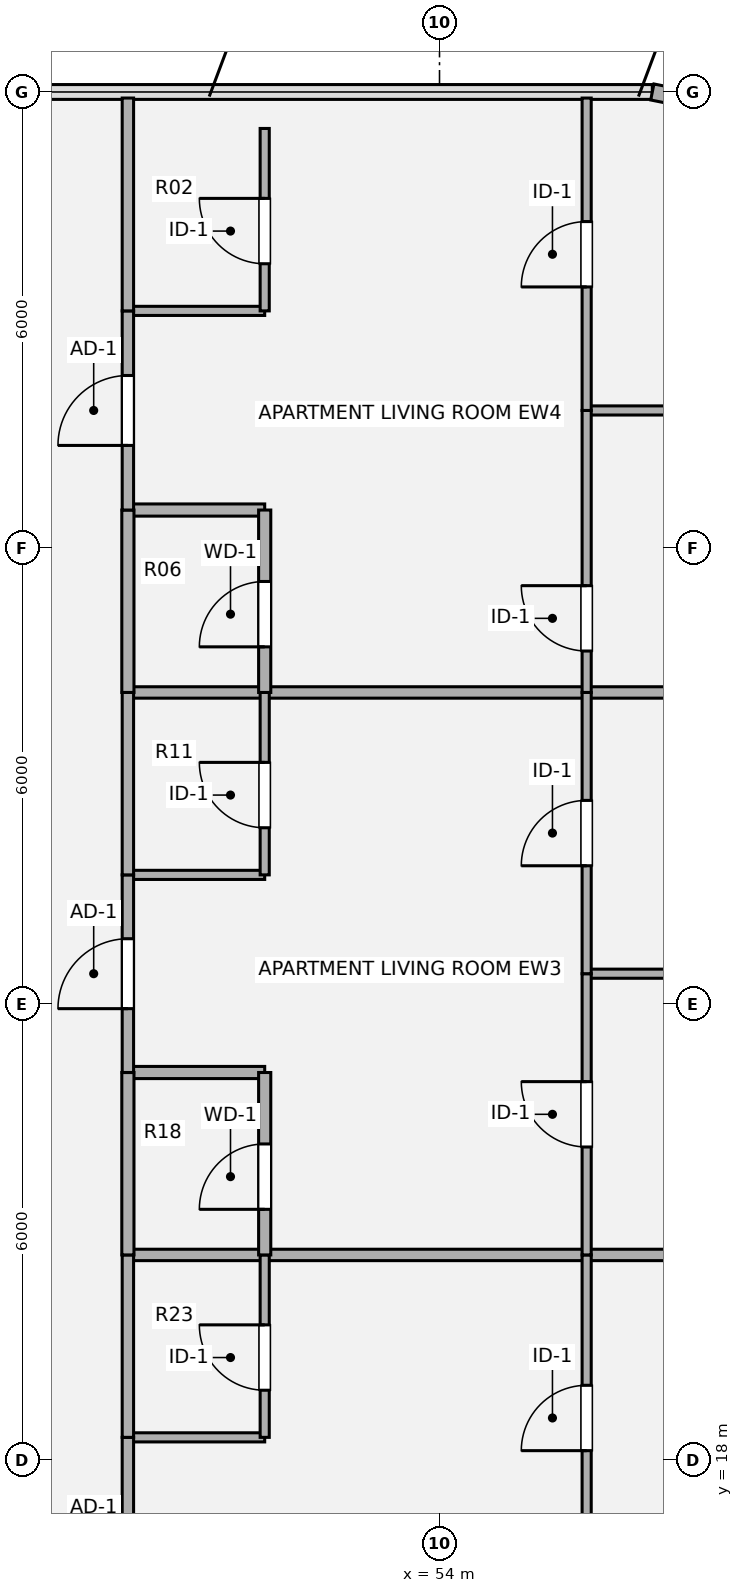
"""IFC4 building model, lengths in metres.
Left out: names, types, materials, properties, quantities, classifications, styles, units other than length and angle.
Written with IfcOpenShell. Run it as: python <this file> out.ifc"""

import sys

from ifc_helpers import new_model, si_unit, direction, frame, frame_2d, origin, origin_2d, place, context, subcontext, project, spatial, rectangle, extrude, source, transform, mapped, element, fill, save


model = new_model("IFC4")
c1 = context("Model", 3, precision=1e-05, world=origin(), true_north=direction((0.0, 1.0)))
c2 = subcontext(c1, "Body", "Model", "MODEL_VIEW")
j1 = project(units=[si_unit("LENGTHUNIT", "METRE"), si_unit("PLANEANGLEUNIT", "RADIAN")], contexts=[c1])
p1 = place(None, origin())
s1 = spatial("IfcSite", under=j1, at=p1, CompositionType="ELEMENT")
p2 = place(p1, origin())
s2 = spatial("IfcBuilding", under=s1, at=p2, CompositionType="ELEMENT")
p3 = place(p2, frame((0.0, 0.0, 30.78)))
s3 = spatial("IfcBuildingStorey", under=s2, at=p3, CompositionType="ELEMENT", Elevation=30.78)
p4 = place(p3, frame((56.8, 36.0, 0.0), z_axis=(0.0, 0.0, 1.0), x_axis=(0.980775717779, -0.195138390419, 0.0)))
e1 = element("IfcWall", 1, at=p4, inside=s3, PredefinedType="SOLIDWALL", context=c2, shape_type="SweptSolid", body=[
    extrude(rectangle(XDim=1.249, YDim=0.215, at=frame_2d((0.624, 0.0))), origin(), (0.0, 0.0, 1.0), 3.53),
])
p5 = place(p3, frame((49.9, 18.3, 0.0), z_axis=(0.0, 0.0, 1.0), x_axis=(1.0, 0.0, 0.0)))
e2 = element("IfcWall", 2, at=p5, inside=s3, PredefinedType="PARTITIONING", context=c2, shape_type="SweptSolid", body=[
    extrude(rectangle(XDim=1.8, YDim=0.12, at=frame_2d((0.9, 0.0))), origin(), (0.0, 0.0, 1.0), 2.715),
])
p6 = place(p3, frame((49.9, 20.7, 0.0), z_axis=(0.0, 0.0, 1.0), x_axis=(1.0, 0.0, 0.0)))
e3 = element("IfcWall", 3, at=p6, inside=s3, PredefinedType="PARTITIONING", context=c2, shape_type="SweptSolid", body=[
    extrude(rectangle(XDim=10.02, YDim=0.15, at=frame_2d((5.01, 0.0))), origin(), (0.0, 0.0, 1.0), 2.982),
])
p7 = place(p3, frame((49.9, 23.1, 0.0), z_axis=(0.0, 0.0, 1.0), x_axis=(1.0, 0.0, 0.0)))
e4 = element("IfcWall", 4, at=p7, inside=s3, PredefinedType="PLUMBINGWALL", context=c2, shape_type="SweptSolid", body=[
    extrude(rectangle(XDim=1.8, YDim=0.16, at=frame_2d((0.9, 0.0))), origin(), (0.0, 0.0, 1.0), 3.055),
])
p8 = place(p3, frame((55.936, 24.4, 0.0), z_axis=(0.0, 0.0, 1.0), x_axis=(1.0, 0.0, 0.0)))
e5 = element("IfcWall", 5, at=p8, inside=s3, PredefinedType="PARTITIONING", context=c2, shape_type="SweptSolid", body=[
    extrude(rectangle(XDim=3.984, YDim=0.12, at=frame_2d((1.992, 0.0))), origin(), (0.0, 0.0, 1.0), 2.982),
])
p9 = place(p3, frame((49.9, 25.7, 0.0), z_axis=(0.0, 0.0, 1.0), x_axis=(1.0, 0.0, 0.0)))
e6 = element("IfcWall", 6, at=p9, inside=s3, PredefinedType="PARTITIONING", context=c2, shape_type="SweptSolid", body=[
    extrude(rectangle(XDim=1.8, YDim=0.12, at=frame_2d((0.9, 0.0))), origin(), (0.0, 0.0, 1.0), 2.982),
])
p10 = place(p3, frame((49.9, 28.1, 0.0), z_axis=(0.0, 0.0, 1.0), x_axis=(1.0, 0.0, 0.0)))
e7 = element("IfcWall", 7, at=p10, inside=s3, PredefinedType="PARTITIONING", context=c2, shape_type="SweptSolid", body=[
    extrude(rectangle(XDim=10.02, YDim=0.15, at=frame_2d((5.01, 0.0))), origin(), (0.0, 0.0, 1.0), 2.982),
])
p11 = place(p3, frame((49.9, 30.5, 0.0), z_axis=(0.0, 0.0, 1.0), x_axis=(1.0, 0.0, 0.0)))
e8 = element("IfcWall", 8, at=p11, inside=s3, PredefinedType="PLUMBINGWALL", context=c2, shape_type="SweptSolid", body=[
    extrude(rectangle(XDim=1.8, YDim=0.16, at=frame_2d((0.9, 0.0))), origin(), (0.0, 0.0, 1.0), 2.903),
])
p12 = place(p3, frame((55.936, 31.81, 0.0), z_axis=(0.0, 0.0, 1.0), x_axis=(1.0, 0.0, 0.0)))
e9 = element("IfcWall", 9, at=p12, inside=s3, PredefinedType="PARTITIONING", context=c2, shape_type="SweptSolid", body=[
    extrude(rectangle(XDim=3.984, YDim=0.12, at=frame_2d((1.992, 0.0))), origin(), (0.0, 0.0, 1.0), 3.5),
])
p13 = place(p3, frame((49.9, 33.12, 0.0), z_axis=(0.0, 0.0, 1.0), x_axis=(1.0, 0.0, 0.0)))
e10 = element("IfcWall", 10, at=p13, inside=s3, PredefinedType="PARTITIONING", context=c2, shape_type="SweptSolid", body=[
    extrude(rectangle(XDim=1.8, YDim=0.12, at=frame_2d((0.9, 0.0))), origin(), (0.0, 0.0, 1.0), 3.055),
])
p14 = place(p3, frame((49.9, 15.8, 0.0), z_axis=(0.0, 0.0, 1.0), x_axis=(0.0, 1.0, 0.0)))
e11 = element("IfcWall", 11, at=p14, inside=s3, PredefinedType="PARTITIONING", context=c2, shape_type="SweptSolid", body=[
    extrude(rectangle(XDim=2.5, YDim=0.15, at=frame_2d((1.25, 0.0))), origin(), (0.0, 0.0, 1.0), 3.5),
])
p15 = place(p14, frame((0.31, 0.0, 0.0)))
e12 = element("IfcOpeningElement", 12, at=p15, cuts=e11, PredefinedType="OPENING", context=c2, shape_type="SweptSolid", body=[
    extrude(rectangle(XDim=0.92, YDim=2.1, at=origin_2d()), frame((0.46, 0.085, 1.05), z_axis=(0.0, -1.0, 0.0), x_axis=(1.0, 0.0, 0.0)), (0.0, 0.0, 1.0), 0.17),
])
p16 = place(p3, frame((49.9, 18.3, 0.0), z_axis=(0.0, 0.0, 1.0), x_axis=(0.0, 1.0, 0.0)))
e13 = element("IfcWall", 13, at=p16, inside=s3, PredefinedType="PARTITIONING", context=c2, shape_type="SweptSolid", body=[
    extrude(rectangle(XDim=2.4, YDim=0.15, at=frame_2d((1.2, 0.0))), origin(), (0.0, 0.0, 1.0), 3.5),
])
p17 = place(p3, frame((49.9, 20.7, 0.0), z_axis=(0.0, 0.0, 1.0), x_axis=(0.0, 1.0, 0.0)))
e14 = element("IfcWall", 14, at=p17, inside=s3, PredefinedType="PLUMBINGWALL", context=c2, shape_type="SweptSolid", body=[
    extrude(rectangle(XDim=2.4, YDim=0.16, at=frame_2d((1.2, 0.0))), origin(), (0.0, 0.0, 1.0), 3.5),
])
p18 = place(p3, frame((49.9, 23.1, 0.0), z_axis=(0.0, 0.0, 1.0), x_axis=(0.0, 1.0, 0.0)))
e15 = element("IfcWall", 15, at=p18, inside=s3, PredefinedType="PARTITIONING", context=c2, shape_type="SweptSolid", body=[
    extrude(rectangle(XDim=2.6, YDim=0.15, at=frame_2d((1.3, 0.0))), origin(), (0.0, 0.0, 1.0), 3.5),
])
p19 = place(p18, frame((0.84, 0.0, 0.0)))
e16 = element("IfcOpeningElement", 16, at=p19, cuts=e15, PredefinedType="OPENING", context=c2, shape_type="SweptSolid", body=[
    extrude(rectangle(XDim=0.92, YDim=2.1, at=origin_2d()), frame((0.46, 0.085, 1.05), z_axis=(0.0, -1.0, 0.0), x_axis=(1.0, 0.0, 0.0)), (0.0, 0.0, 1.0), 0.17),
])
p20 = place(p3, frame((49.9, 25.7, 0.0), z_axis=(0.0, 0.0, 1.0), x_axis=(0.0, 1.0, 0.0)))
e17 = element("IfcWall", 17, at=p20, inside=s3, PredefinedType="PARTITIONING", context=c2, shape_type="SweptSolid", body=[
    extrude(rectangle(XDim=2.4, YDim=0.15, at=frame_2d((1.2, 0.0))), origin(), (0.0, 0.0, 1.0), 3.5),
])
p21 = place(p3, frame((49.9, 28.1, 0.0), z_axis=(0.0, 0.0, 1.0), x_axis=(0.0, 1.0, 0.0)))
e18 = element("IfcWall", 18, at=p21, inside=s3, PredefinedType="PLUMBINGWALL", context=c2, shape_type="SweptSolid", body=[
    extrude(rectangle(XDim=2.4, YDim=0.16, at=frame_2d((1.2, 0.0))), origin(), (0.0, 0.0, 1.0), 3.5),
])
p22 = place(p3, frame((49.9, 30.5, 0.0), z_axis=(0.0, 0.0, 1.0), x_axis=(0.0, 1.0, 0.0)))
e19 = element("IfcWall", 19, at=p22, inside=s3, PredefinedType="PARTITIONING", context=c2, shape_type="SweptSolid", body=[
    extrude(rectangle(XDim=2.62, YDim=0.15, at=frame_2d((1.31, 0.0))), origin(), (0.0, 0.0, 1.0), 3.5),
])
p23 = place(p22, frame((0.85, 0.0, 0.0)))
e20 = element("IfcOpeningElement", 20, at=p23, cuts=e19, PredefinedType="OPENING", context=c2, shape_type="SweptSolid", body=[
    extrude(rectangle(XDim=0.92, YDim=2.1, at=origin_2d()), frame((0.46, 0.085, 1.05), z_axis=(0.0, -1.0, 0.0), x_axis=(1.0, 0.0, 0.0)), (0.0, 0.0, 1.0), 0.17),
])
p24 = place(p3, frame((49.9, 33.12, 0.0), z_axis=(0.0, 0.0, 1.0), x_axis=(0.0, 1.0, 0.0)))
e21 = element("IfcWall", 21, at=p24, inside=s3, PredefinedType="PARTITIONING", context=c2, shape_type="SweptSolid", body=[
    extrude(rectangle(XDim=2.8, YDim=0.15, at=frame_2d((1.4, 0.0))), origin(), (0.0, 0.0, 1.0), 3.5),
])
p25 = place(p3, frame((51.7, 18.3, 0.0), z_axis=(0.0, 0.0, 1.0), x_axis=(0.0, 1.0, 0.0)))
e22 = element("IfcWall", 22, at=p25, inside=s3, PredefinedType="PARTITIONING", context=c2, shape_type="SweptSolid", body=[
    extrude(rectangle(XDim=2.4, YDim=0.12, at=frame_2d((1.2, 0.0))), origin(), (0.0, 0.0, 1.0), 3.5),
])
p26 = place(p25, frame((0.62, 0.0, 0.0)))
e23 = element("IfcOpeningElement", 23, at=p26, cuts=e22, PredefinedType="OPENING", context=c2, shape_type="SweptSolid", body=[
    extrude(rectangle(XDim=0.86, YDim=2.1, at=origin_2d()), frame((0.43, 0.07, 1.05), z_axis=(0.0, -1.0, 0.0), x_axis=(1.0, 0.0, 0.0)), (0.0, 0.0, 1.0), 0.14),
])
p27 = place(p3, frame((51.7, 20.7, 0.0), z_axis=(0.0, 0.0, 1.0), x_axis=(0.0, 1.0, 0.0)))
e24 = element("IfcWall", 24, at=p27, inside=s3, PredefinedType="PLUMBINGWALL", context=c2, shape_type="SweptSolid", body=[
    extrude(rectangle(XDim=2.4, YDim=0.16, at=frame_2d((1.2, 0.0))), origin(), (0.0, 0.0, 1.0), 3.5),
])
p28 = place(p27, frame((0.6, 0.0, 0.0)))
e25 = element("IfcOpeningElement", 25, at=p28, cuts=e24, PredefinedType="OPENING", context=c2, shape_type="SweptSolid", body=[
    extrude(rectangle(XDim=0.86, YDim=2.1, at=origin_2d()), frame((0.43, 0.09, 1.05), z_axis=(0.0, -1.0, 0.0), x_axis=(1.0, 0.0, 0.0)), (0.0, 0.0, 1.0), 0.18),
])
p29 = place(p3, frame((51.7, 25.7, 0.0), z_axis=(0.0, 0.0, 1.0), x_axis=(0.0, 1.0, 0.0)))
e26 = element("IfcWall", 26, at=p29, inside=s3, PredefinedType="PARTITIONING", context=c2, shape_type="SweptSolid", body=[
    extrude(rectangle(XDim=2.4, YDim=0.12, at=frame_2d((1.2, 0.0))), origin(), (0.0, 0.0, 1.0), 3.5),
])
p30 = place(p29, frame((0.62, 0.0, 0.0)))
e27 = element("IfcOpeningElement", 27, at=p30, cuts=e26, PredefinedType="OPENING", context=c2, shape_type="SweptSolid", body=[
    extrude(rectangle(XDim=0.86, YDim=2.1, at=origin_2d()), frame((0.43, 0.07, 1.05), z_axis=(0.0, -1.0, 0.0), x_axis=(1.0, 0.0, 0.0)), (0.0, 0.0, 1.0), 0.14),
])
p31 = place(p3, frame((51.7, 28.1, 0.0), z_axis=(0.0, 0.0, 1.0), x_axis=(0.0, 1.0, 0.0)))
e28 = element("IfcWall", 28, at=p31, inside=s3, PredefinedType="PLUMBINGWALL", context=c2, shape_type="SweptSolid", body=[
    extrude(rectangle(XDim=2.4, YDim=0.16, at=frame_2d((1.2, 0.0))), origin(), (0.0, 0.0, 1.0), 3.5),
])
p32 = place(p31, frame((0.6, 0.0, 0.0)))
e29 = element("IfcOpeningElement", 29, at=p32, cuts=e28, PredefinedType="OPENING", context=c2, shape_type="SweptSolid", body=[
    extrude(rectangle(XDim=0.86, YDim=2.1, at=origin_2d()), frame((0.43, 0.09, 1.05), z_axis=(0.0, -1.0, 0.0), x_axis=(1.0, 0.0, 0.0)), (0.0, 0.0, 1.0), 0.18),
])
p33 = place(p3, frame((51.7, 33.12, 0.0), z_axis=(0.0, 0.0, 1.0), x_axis=(0.0, 1.0, 0.0)))
e30 = element("IfcWall", 30, at=p33, inside=s3, PredefinedType="PARTITIONING", context=c2, shape_type="SweptSolid", body=[
    extrude(rectangle(XDim=2.4, YDim=0.12, at=frame_2d((1.2, 0.0))), origin(), (0.0, 0.0, 1.0), 3.5),
])
p34 = place(p33, frame((0.62, 0.0, 0.0)))
e31 = element("IfcOpeningElement", 31, at=p34, cuts=e30, PredefinedType="OPENING", context=c2, shape_type="SweptSolid", body=[
    extrude(rectangle(XDim=0.86, YDim=2.1, at=origin_2d()), frame((0.43, 0.07, 1.05), z_axis=(0.0, -1.0, 0.0), x_axis=(1.0, 0.0, 0.0)), (0.0, 0.0, 1.0), 0.14),
])
p35 = place(p3, frame((55.936, 17.05, 0.0), z_axis=(0.0, 0.0, 1.0), x_axis=(0.0, 1.0, 0.0)))
e32 = element("IfcWall", 32, at=p35, inside=s3, PredefinedType="PARTITIONING", context=c2, shape_type="SweptSolid", body=[
    extrude(rectangle(XDim=3.65, YDim=0.12, at=frame_2d((1.825, 0.0))), origin(), (0.0, 0.0, 1.0), 3.5),
])
p36 = place(p35, frame((1.075, 0.0, 0.0)))
e33 = element("IfcOpeningElement", 33, at=p36, cuts=e32, PredefinedType="OPENING", context=c2, shape_type="SweptSolid", body=[
    extrude(rectangle(XDim=0.86, YDim=2.1, at=origin_2d()), frame((0.43, 0.07, 1.05), z_axis=(0.0, -1.0, 0.0), x_axis=(1.0, 0.0, 0.0)), (0.0, 0.0, 1.0), 0.14),
])
p37 = place(p3, frame((55.936, 20.7, 0.0), z_axis=(0.0, 0.0, 1.0), x_axis=(0.0, 1.0, 0.0)))
e34 = element("IfcWall", 34, at=p37, inside=s3, PredefinedType="PARTITIONING", context=c2, shape_type="SweptSolid", body=[
    extrude(rectangle(XDim=3.7, YDim=0.12, at=frame_2d((1.85, 0.0))), origin(), (0.0, 0.0, 1.0), 3.5),
])
p38 = place(p37, frame((1.42, 0.0, 0.0)))
e35 = element("IfcOpeningElement", 35, at=p38, cuts=e34, PredefinedType="OPENING", context=c2, shape_type="SweptSolid", body=[
    extrude(rectangle(XDim=0.86, YDim=2.1, at=origin_2d()), frame((0.43, 0.07, 1.05), z_axis=(0.0, -1.0, 0.0), x_axis=(1.0, 0.0, 0.0)), (0.0, 0.0, 1.0), 0.14),
])
p39 = place(p3, frame((55.936, 24.4, 0.0), z_axis=(0.0, 0.0, 1.0), x_axis=(0.0, 1.0, 0.0)))
e36 = element("IfcWall", 36, at=p39, inside=s3, PredefinedType="PARTITIONING", context=c2, shape_type="SweptSolid", body=[
    extrude(rectangle(XDim=3.7, YDim=0.12, at=frame_2d((1.85, 0.0))), origin(), (0.0, 0.0, 1.0), 3.5),
])
p40 = place(p39, frame((1.42, 0.0, 0.0)))
e37 = element("IfcOpeningElement", 37, at=p40, cuts=e36, PredefinedType="OPENING", context=c2, shape_type="SweptSolid", body=[
    extrude(rectangle(XDim=0.86, YDim=2.1, at=origin_2d()), frame((0.43, 0.07, 1.05), z_axis=(0.0, -1.0, 0.0), x_axis=(1.0, 0.0, 0.0)), (0.0, 0.0, 1.0), 0.14),
])
p41 = place(p3, frame((55.936, 28.1, 0.0), z_axis=(0.0, 0.0, 1.0), x_axis=(0.0, 1.0, 0.0)))
e38 = element("IfcWall", 38, at=p41, inside=s3, PredefinedType="PARTITIONING", context=c2, shape_type="SweptSolid", body=[
    extrude(rectangle(XDim=3.71, YDim=0.12, at=frame_2d((1.855, 0.0))), origin(), (0.0, 0.0, 1.0), 3.5),
])
p42 = place(p41, frame((0.545, 0.0, 0.0)))
e39 = element("IfcOpeningElement", 39, at=p42, cuts=e38, PredefinedType="OPENING", context=c2, shape_type="SweptSolid", body=[
    extrude(rectangle(XDim=0.86, YDim=2.1, at=origin_2d()), frame((0.43, 0.07, 1.05), z_axis=(0.0, -1.0, 0.0), x_axis=(1.0, 0.0, 0.0)), (0.0, 0.0, 1.0), 0.14),
])
p43 = place(p3, frame((55.936, 31.81, 0.0), z_axis=(0.0, 0.0, 1.0), x_axis=(0.0, 1.0, 0.0)))
e40 = element("IfcWall", 40, at=p43, inside=s3, PredefinedType="PARTITIONING", context=c2, shape_type="SweptSolid", body=[
    extrude(rectangle(XDim=4.11, YDim=0.12, at=frame_2d((2.055, 0.0))), origin(), (0.0, 0.0, 1.0), 3.5),
])
p44 = place(p43, frame((1.625, 0.0, 0.0)))
e41 = element("IfcOpeningElement", 41, at=p44, cuts=e40, PredefinedType="OPENING", context=c2, shape_type="SweptSolid", body=[
    extrude(rectangle(XDim=0.86, YDim=2.1, at=origin_2d()), frame((0.43, 0.07, 1.05), z_axis=(0.0, -1.0, 0.0), x_axis=(1.0, 0.0, 0.0)), (0.0, 0.0, 1.0), 0.14),
])
m1 = source(origin(), c2, "Body", "SweptSolid", [
    extrude(rectangle(XDim=0.92, YDim=2.1, at=origin_2d()), frame((0.46, 0.025, 1.05), z_axis=(0.0, -1.0, 0.0), x_axis=(1.0, 0.0, 0.0)), (0.0, 0.0, 1.0), 0.05),
])
p45 = place(p19, origin())
e42 = element("IfcDoor", 42, at=p45, inside=s3, OperationType="SINGLE_SWING_LEFT", PredefinedType="DOOR", context=c2, shape_type="MappedRepresentation", body=[
    mapped(m1, transform((0.0, 0.0, 0.0), x_axis=(1.0, 0.0, 0.0), y_axis=(0.0, 1.0, 0.0), z_axis=(0.0, 0.0, 1.0), scale=1.0)),
])
fill(e16, e42)
p46 = place(p23, origin())
e43 = element("IfcDoor", 43, at=p46, inside=s3, OperationType="SINGLE_SWING_LEFT", PredefinedType="DOOR", context=c2, shape_type="MappedRepresentation", body=[
    mapped(m1, transform((0.0, 0.0, 0.0), x_axis=(1.0, 0.0, 0.0), y_axis=(0.0, 1.0, 0.0), z_axis=(0.0, 0.0, 1.0), scale=1.0)),
])
fill(e20, e43)
m2 = source(origin(), c2, "Body", "SweptSolid", [
    extrude(rectangle(XDim=0.86, YDim=2.1, at=origin_2d()), frame((0.43, 0.025, 1.05), z_axis=(0.0, -1.0, 0.0), x_axis=(1.0, 0.0, 0.0)), (0.0, 0.0, 1.0), 0.05),
])
p47 = place(p26, origin())
e44 = element("IfcDoor", 44, at=p47, inside=s3, OperationType="SINGLE_SWING_RIGHT", PredefinedType="DOOR", context=c2, shape_type="MappedRepresentation", body=[
    mapped(m2, transform((0.0, 0.0, 0.0), x_axis=(1.0, 0.0, 0.0), y_axis=(0.0, 1.0, 0.0), z_axis=(0.0, 0.0, 1.0), scale=1.0)),
])
fill(e23, e44)
m3 = source(origin(), c2, "Body", "SweptSolid", [
    extrude(rectangle(XDim=0.86, YDim=2.1, at=origin_2d()), frame((0.43, 0.025, 1.05), z_axis=(0.0, -1.0, 0.0), x_axis=(1.0, 0.0, 0.0)), (0.0, 0.0, 1.0), 0.05),
])
p48 = place(p28, origin())
e45 = element("IfcDoor", 45, at=p48, inside=s3, OperationType="SINGLE_SWING_LEFT", PredefinedType="DOOR", context=c2, shape_type="MappedRepresentation", body=[
    mapped(m3, transform((0.0, 0.0, 0.0), x_axis=(1.0, 0.0, 0.0), y_axis=(0.0, 1.0, 0.0), z_axis=(0.0, 0.0, 1.0), scale=1.0)),
])
fill(e25, e45)
p49 = place(p30, origin())
e46 = element("IfcDoor", 46, at=p49, inside=s3, OperationType="SINGLE_SWING_RIGHT", PredefinedType="DOOR", context=c2, shape_type="MappedRepresentation", body=[
    mapped(m2, transform((0.0, 0.0, 0.0), x_axis=(1.0, 0.0, 0.0), y_axis=(0.0, 1.0, 0.0), z_axis=(0.0, 0.0, 1.0), scale=1.0)),
])
fill(e27, e46)
p50 = place(p32, origin())
e47 = element("IfcDoor", 47, at=p50, inside=s3, OperationType="SINGLE_SWING_LEFT", PredefinedType="DOOR", context=c2, shape_type="MappedRepresentation", body=[
    mapped(m3, transform((0.0, 0.0, 0.0), x_axis=(1.0, 0.0, 0.0), y_axis=(0.0, 1.0, 0.0), z_axis=(0.0, 0.0, 1.0), scale=1.0)),
])
fill(e29, e47)
p51 = place(p34, origin())
e48 = element("IfcDoor", 48, at=p51, inside=s3, OperationType="SINGLE_SWING_RIGHT", PredefinedType="DOOR", context=c2, shape_type="MappedRepresentation", body=[
    mapped(m2, transform((0.0, 0.0, 0.0), x_axis=(1.0, 0.0, 0.0), y_axis=(0.0, 1.0, 0.0), z_axis=(0.0, 0.0, 1.0), scale=1.0)),
])
fill(e31, e48)
p52 = place(p36, origin())
e49 = element("IfcDoor", 49, at=p52, inside=s3, OperationType="SINGLE_SWING_LEFT", PredefinedType="DOOR", context=c2, shape_type="MappedRepresentation", body=[
    mapped(m2, transform((0.0, 0.0, 0.0), x_axis=(1.0, 0.0, 0.0), y_axis=(0.0, 1.0, 0.0), z_axis=(0.0, 0.0, 1.0), scale=1.0)),
])
fill(e33, e49)
p53 = place(p38, origin())
e50 = element("IfcDoor", 50, at=p53, inside=s3, OperationType="SINGLE_SWING_RIGHT", PredefinedType="DOOR", context=c2, shape_type="MappedRepresentation", body=[
    mapped(m2, transform((0.0, 0.0, 0.0), x_axis=(1.0, 0.0, 0.0), y_axis=(0.0, 1.0, 0.0), z_axis=(0.0, 0.0, 1.0), scale=1.0)),
])
fill(e35, e50)
p54 = place(p40, origin())
e51 = element("IfcDoor", 51, at=p54, inside=s3, OperationType="SINGLE_SWING_LEFT", PredefinedType="DOOR", context=c2, shape_type="MappedRepresentation", body=[
    mapped(m2, transform((0.0, 0.0, 0.0), x_axis=(1.0, 0.0, 0.0), y_axis=(0.0, 1.0, 0.0), z_axis=(0.0, 0.0, 1.0), scale=1.0)),
])
fill(e37, e51)
p55 = place(p42, origin())
e52 = element("IfcDoor", 52, at=p55, inside=s3, OperationType="SINGLE_SWING_RIGHT", PredefinedType="DOOR", context=c2, shape_type="MappedRepresentation", body=[
    mapped(m2, transform((0.0, 0.0, 0.0), x_axis=(1.0, 0.0, 0.0), y_axis=(0.0, 1.0, 0.0), z_axis=(0.0, 0.0, 1.0), scale=1.0)),
])
fill(e39, e52)
p56 = place(p44, origin())
e53 = element("IfcDoor", 53, at=p56, inside=s3, OperationType="SINGLE_SWING_LEFT", PredefinedType="DOOR", context=c2, shape_type="MappedRepresentation", body=[
    mapped(m2, transform((0.0, 0.0, 0.0), x_axis=(1.0, 0.0, 0.0), y_axis=(0.0, 1.0, 0.0), z_axis=(0.0, 0.0, 1.0), scale=1.0)),
])
fill(e41, e53)
save(model, sys.argv[1])
